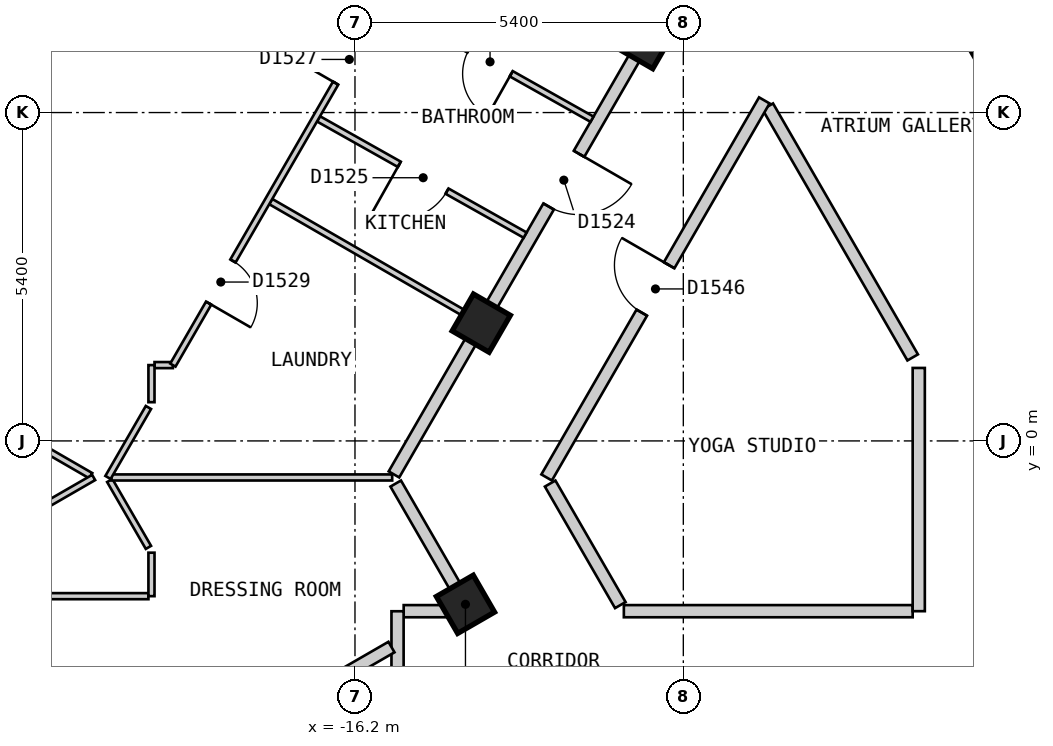
"""IFC4 building model, lengths in metres.
Left out: names, types, materials, properties, quantities, classifications, styles, units other than length and angle.
Written with IfcOpenShell. Run it as: python <this file> out.ifc"""

import sys

from ifc_helpers import new_model, si_unit, direction, frame, frame_2d, origin, origin_2d, place, context, subcontext, project, spatial, polyline, rectangle, outline, extrude, element, fill, save


model = new_model("IFC4")
c1 = context("Model", 3, precision=1e-05, world=origin(), true_north=direction((0.0, 1.0)))
c2 = subcontext(c1, "Body", "Model", "MODEL_VIEW")
j1 = project(units=[si_unit("LENGTHUNIT", "METRE"), si_unit("PLANEANGLEUNIT", "RADIAN")], contexts=[c1])
p1 = place(None, origin())
s1 = spatial("IfcSite", under=j1, at=p1, CompositionType="ELEMENT")
p2 = place(p1, origin())
s2 = spatial("IfcBuilding", under=s1, at=p2, CompositionType="ELEMENT")
p3 = place(p2, frame((0.0, 0.0, 184.2)))
s3 = spatial("IfcBuildingStorey", under=s2, at=p3, CompositionType="ELEMENT", Elevation=184.2)
for number, where, z_axis, x_axis in (
    (1, (-14.383, -2.687, 0.0), (0.0, 0.0, 1.0), (0.5, -0.866, 0.0)),
    (2, (-11.431, 6.6, 0.0), (0.0, 0.0, 1.0), (-0.5, -0.866, 0.0)),
    (3, (-14.123, 1.937, 0.0), (0.0, 0.0, 1.0), (-0.5, -0.866, 0.0)),
):
    element("IfcColumn", number, at=place(p3, frame(where, z_axis=z_axis, x_axis=x_axis)), inside=s3, PredefinedType="COLUMN", context=c2, shape_type="SweptSolid", body=[
        extrude(rectangle(XDim=0.7, YDim=0.7, at=origin_2d()), origin(), (0.0, 0.0, 1.0), 3.0),
    ])
p4 = place(p3, frame((-14.592, 21.625, 0.0), z_axis=(0.0, 0.0, 1.0), x_axis=(-0.500010537973, -0.866019319597, 0.0)))
e4 = element("IfcWall", 4, at=p4, inside=s3, PredefinedType="SOLIDWALL", context=c2, shape_type="SweptSolid", body=[
    extrude(outline(polyline([(0.0, -0.15), (22.863, -0.15), (22.783, 0.15), (0.08, 0.15), (0.0, -0.15)])), origin(), (0.0, 0.0, 1.0), 2.7),
])
p5 = place(p4, frame((1.259, 0.0, 0.15)))
e5 = element("IfcOpeningElement", 5, at=p5, cuts=e4, PredefinedType="OPENING", context=c2, shape_type="SweptSolid", body=[
    extrude(rectangle(XDim=1.5, YDim=2.1, at=frame_2d((0.75, 1.05))), frame((0.0, 0.16, 0.0), z_axis=(0.0, -1.0, 0.0), x_axis=(1.0, 0.0, 0.0)), (0.0, 0.0, 1.0), 0.32),
])
p6 = place(p4, frame((3.952, 0.0, 0.15)))
e6 = element("IfcOpeningElement", 6, at=p6, cuts=e4, PredefinedType="OPENING", context=c2, shape_type="SweptSolid", body=[
    extrude(rectangle(XDim=1.5, YDim=2.1, at=frame_2d((0.75, 1.05))), frame((0.0, 0.16, 0.0), z_axis=(0.0, -1.0, 0.0), x_axis=(1.0, 0.0, 0.0)), (0.0, 0.0, 1.0), 0.32),
])
p7 = place(p4, frame((6.644, 0.0, 0.15)))
e7 = element("IfcOpeningElement", 7, at=p7, cuts=e4, PredefinedType="OPENING", context=c2, shape_type="SweptSolid", body=[
    extrude(rectangle(XDim=1.5, YDim=2.1, at=frame_2d((0.75, 1.05))), frame((0.0, 0.16, 0.0), z_axis=(0.0, -1.0, 0.0), x_axis=(1.0, 0.0, 0.0)), (0.0, 0.0, 1.0), 0.32),
])
p8 = place(p4, frame((9.335, 0.0, 0.15)))
e8 = element("IfcOpeningElement", 8, at=p8, cuts=e4, PredefinedType="OPENING", context=c2, shape_type="SweptSolid", body=[
    extrude(rectangle(XDim=1.5, YDim=2.1, at=frame_2d((0.75, 1.05))), frame((0.0, 0.16, 0.0), z_axis=(0.0, -1.0, 0.0), x_axis=(1.0, 0.0, 0.0)), (0.0, 0.0, 1.0), 0.32),
])
p9 = place(p4, frame((12.028, 0.0, 0.15)))
e9 = element("IfcOpeningElement", 9, at=p9, cuts=e4, PredefinedType="OPENING", context=c2, shape_type="SweptSolid", body=[
    extrude(rectangle(XDim=1.5, YDim=2.1, at=frame_2d((0.75, 1.05))), frame((0.0, 0.16, 0.0), z_axis=(0.0, -1.0, 0.0), x_axis=(1.0, 0.0, 0.0)), (0.0, 0.0, 1.0), 0.32),
])
p10 = place(p4, frame((14.72, 0.0, 0.15)))
e10 = element("IfcOpeningElement", 10, at=p10, cuts=e4, PredefinedType="OPENING", context=c2, shape_type="SweptSolid", body=[
    extrude(rectangle(XDim=1.5, YDim=2.1, at=frame_2d((0.75, 1.05))), frame((0.0, 0.16, 0.0), z_axis=(0.0, -1.0, 0.0), x_axis=(1.0, 0.0, 0.0)), (0.0, 0.0, 1.0), 0.32),
])
p11 = place(p4, frame((17.411, 0.0, 0.15)))
e11 = element("IfcOpeningElement", 11, at=p11, cuts=e4, PredefinedType="OPENING", context=c2, shape_type="SweptSolid", body=[
    extrude(rectangle(XDim=1.5, YDim=2.1, at=frame_2d((0.75, 1.05))), frame((0.0, 0.16, 0.0), z_axis=(0.0, -1.0, 0.0), x_axis=(1.0, 0.0, 0.0)), (0.0, 0.0, 1.0), 0.32),
])
p12 = place(p4, frame((20.104, 0.0, 0.15)))
e12 = element("IfcOpeningElement", 12, at=p12, cuts=e4, PredefinedType="OPENING", context=c2, shape_type="SweptSolid", body=[
    extrude(rectangle(XDim=1.5, YDim=2.1, at=frame_2d((0.75, 1.05))), frame((0.0, 0.16, 0.0), z_axis=(0.0, -1.0, 0.0), x_axis=(1.0, 0.0, 0.0)), (0.0, 0.0, 1.0), 0.32),
])
p13 = place(p3, frame((-26.024, -3.025, 0.0), z_axis=(0.0, 0.0, 1.0), x_axis=(0.500018670445, -0.86601462413, 0.0)))
e13 = element("IfcWall", 13, at=p13, inside=s3, PredefinedType="SOLIDWALL", context=c2, shape_type="SweptSolid", body=[
    extrude(outline(polyline([(0.0, -0.15), (20.785, -0.15), (20.705, 0.15), (0.08, 0.15), (0.0, -0.15)])), origin(), (0.0, 0.0, 1.0), 2.7),
])
p14 = place(p13, frame((1.13, 0.0, 0.15)))
e14 = element("IfcOpeningElement", 14, at=p14, cuts=e13, PredefinedType="OPENING", context=c2, shape_type="SweptSolid", body=[
    extrude(rectangle(XDim=1.5, YDim=2.1, at=frame_2d((0.75, 1.05))), frame((0.0, 0.16, 0.0), z_axis=(0.0, -1.0, 0.0), x_axis=(1.0, 0.0, 0.0)), (0.0, 0.0, 1.0), 0.32),
])
p15 = place(p13, frame((3.562, 0.0, 0.15)))
e15 = element("IfcOpeningElement", 15, at=p15, cuts=e13, PredefinedType="OPENING", context=c2, shape_type="SweptSolid", body=[
    extrude(rectangle(XDim=1.5, YDim=2.1, at=frame_2d((0.75, 1.05))), frame((0.0, 0.16, 0.0), z_axis=(0.0, -1.0, 0.0), x_axis=(1.0, 0.0, 0.0)), (0.0, 0.0, 1.0), 0.32),
])
p16 = place(p13, frame((5.994, 0.0, 0.15)))
e16 = element("IfcOpeningElement", 16, at=p16, cuts=e13, PredefinedType="OPENING", context=c2, shape_type="SweptSolid", body=[
    extrude(rectangle(XDim=1.5, YDim=2.1, at=frame_2d((0.75, 1.05))), frame((0.0, 0.16, 0.0), z_axis=(0.0, -1.0, 0.0), x_axis=(1.0, 0.0, 0.0)), (0.0, 0.0, 1.0), 0.32),
])
p17 = place(p13, frame((8.425, 0.0, 0.15)))
e17 = element("IfcOpeningElement", 17, at=p17, cuts=e13, PredefinedType="OPENING", context=c2, shape_type="SweptSolid", body=[
    extrude(rectangle(XDim=1.5, YDim=2.1, at=frame_2d((0.75, 1.05))), frame((0.0, 0.16, 0.0), z_axis=(0.0, -1.0, 0.0), x_axis=(1.0, 0.0, 0.0)), (0.0, 0.0, 1.0), 0.32),
])
p18 = place(p13, frame((10.857, 0.0, 0.15)))
e18 = element("IfcOpeningElement", 18, at=p18, cuts=e13, PredefinedType="OPENING", context=c2, shape_type="SweptSolid", body=[
    extrude(rectangle(XDim=1.5, YDim=2.1, at=frame_2d((0.75, 1.05))), frame((0.0, 0.16, 0.0), z_axis=(0.0, -1.0, 0.0), x_axis=(1.0, 0.0, 0.0)), (0.0, 0.0, 1.0), 0.32),
])
p19 = place(p13, frame((13.289, 0.0, 0.15)))
e19 = element("IfcOpeningElement", 19, at=p19, cuts=e13, PredefinedType="OPENING", context=c2, shape_type="SweptSolid", body=[
    extrude(rectangle(XDim=1.5, YDim=2.1, at=frame_2d((0.75, 1.05))), frame((0.0, 0.16, 0.0), z_axis=(0.0, -1.0, 0.0), x_axis=(1.0, 0.0, 0.0)), (0.0, 0.0, 1.0), 0.32),
])
p20 = place(p13, frame((15.722, 0.0, 0.15)))
e20 = element("IfcOpeningElement", 20, at=p20, cuts=e13, PredefinedType="OPENING", context=c2, shape_type="SweptSolid", body=[
    extrude(rectangle(XDim=1.5, YDim=2.1, at=frame_2d((0.75, 1.05))), frame((0.0, 0.16, 0.0), z_axis=(0.0, -1.0, 0.0), x_axis=(1.0, 0.0, 0.0)), (0.0, 0.0, 1.0), 0.32),
])
p21 = place(p13, frame((18.154, 0.0, 0.15)))
e21 = element("IfcOpeningElement", 21, at=p21, cuts=e13, PredefinedType="OPENING", context=c2, shape_type="SweptSolid", body=[
    extrude(rectangle(XDim=1.5, YDim=2.1, at=frame_2d((0.75, 1.05))), frame((0.0, 0.16, 0.0), z_axis=(0.0, -1.0, 0.0), x_axis=(1.0, 0.0, 0.0)), (0.0, 0.0, 1.0), 0.32),
])
p22 = place(p3, frame((-9.411, 5.5, 0.0), z_axis=(0.0, 0.0, 1.0), x_axis=(0.500018099276, -0.86601495391, 0.0)))
e22 = element("IfcWall", 22, at=p22, inside=s3, PredefinedType="PARTITIONING", context=c2, shape_type="SweptSolid", body=[
    extrude(rectangle(XDim=4.765, YDim=0.2, at=frame_2d((2.383, 0.0))), origin(), (0.0, 0.0, 1.0), 2.7),
])
for number, where, z_axis, x_axis in (
    (23, (-12.99, -0.701, 0.0), (0.0, 0.0, 1.0), (0.5, -0.866, 0.0)),
    (24, (-15.53, -0.701, 0.0), (0.0, 0.0, 1.0), (0.5, -0.866, 0.0)),
):
    element("IfcWall", number, at=place(p3, frame(where, z_axis=z_axis, x_axis=x_axis)), inside=s3, PredefinedType="PARTITIONING", context=c2, shape_type="SweptSolid", body=[
        extrude(rectangle(XDim=2.308, YDim=0.2, at=frame_2d((1.154, 0.0))), origin(), (0.0, 0.0, 1.0), 2.7),
    ])
p23 = place(p3, frame((-15.399, -2.8, 0.0), z_axis=(0.0, 0.0, 1.0), x_axis=(1.0, 0.0, 0.0)))
e25 = element("IfcWall", 25, at=p23, inside=s3, PredefinedType="PARTITIONING", context=c2, shape_type="SweptSolid", body=[
    extrude(rectangle(XDim=1.081, YDim=0.2, at=frame_2d((0.541, 0.0))), origin(), (0.0, 0.0, 1.0), 2.7),
])
p24 = place(p3, frame((-11.778, -2.8, 0.0), z_axis=(0.0, 0.0, 1.0), x_axis=(1.0, 0.0, 0.0)))
e26 = element("IfcWall", 26, at=p24, inside=s3, PredefinedType="PARTITIONING", context=c2, shape_type="SweptSolid", body=[
    extrude(rectangle(XDim=4.75, YDim=0.2, at=frame_2d((2.375, 0.0))), origin(), (0.0, 0.0, 1.0), 2.7),
])
p25 = place(p3, frame((-13.048, -0.601, 0.0), z_axis=(0.0, 0.0, 1.0), x_axis=(0.499982180423, 0.866035691677, 0.0)))
e27 = element("IfcWall", 27, at=p25, inside=s3, PredefinedType="PARTITIONING", context=c2, shape_type="SweptSolid", body=[
    extrude(rectangle(XDim=7.16, YDim=0.2, at=frame_2d((3.58, 0.0))), origin(), (0.0, 0.0, 1.0), 2.7),
])
p26 = place(p25, frame((3.13, 0.0, 0.0)))
e28 = element("IfcOpeningElement", 28, at=p26, cuts=e27, PredefinedType="OPENING", context=c2, shape_type="SweptSolid", body=[
    extrude(rectangle(XDim=0.9, YDim=2.1, at=frame_2d((0.45, 1.05))), frame((0.0, 0.11, 0.0), z_axis=(0.0, -1.0, 0.0), x_axis=(1.0, 0.0, 0.0)), (0.0, 0.0, 1.0), 0.22),
])
p27 = place(p3, frame((-15.559, -0.551, 0.0), z_axis=(0.0, 0.0, 1.0), x_axis=(0.499964997208, 0.866045611713, 0.0)))
e29 = element("IfcWall", 29, at=p27, inside=s3, PredefinedType="PARTITIONING", context=c2, shape_type="SweptSolid", body=[
    extrude(rectangle(XDim=9.643, YDim=0.2, at=frame_2d((4.821, 0.0))), origin(), (0.0, 0.0, 1.0), 2.7),
])
p28 = place(p27, frame((5.088, 0.0, 0.0)))
e30 = element("IfcOpeningElement", 30, at=p28, cuts=e29, PredefinedType="OPENING", context=c2, shape_type="SweptSolid", body=[
    extrude(rectangle(XDim=1.0, YDim=2.1, at=frame_2d((0.5, 1.05))), frame((0.0, 0.11, 0.0), z_axis=(0.0, -1.0, 0.0), x_axis=(1.0, 0.0, 0.0)), (0.0, 0.0, 1.0), 0.22),
])
p29 = place(p3, frame((-6.928, -2.8, 0.0), z_axis=(0.0, 0.0, 1.0), x_axis=(0.0, 1.0, 0.0)))
e31 = element("IfcWall", 31, at=p29, inside=s3, PredefinedType="PARTITIONING", context=c2, shape_type="SweptSolid", body=[
    extrude(rectangle(XDim=4.0, YDim=0.2, at=frame_2d((2.0, 0.0))), origin(), (0.0, 0.0, 1.0), 2.7),
])
p30 = place(p3, frame((-15.5, -6.6, 0.0), z_axis=(0.0, 0.0, 1.0), x_axis=(0.0, 1.0, 0.0)))
e32 = element("IfcWall", 32, at=p30, inside=s3, PredefinedType="PARTITIONING", context=c2, shape_type="SweptSolid", body=[
    extrude(rectangle(XDim=3.799, YDim=0.2, at=frame_2d((1.899, 0.0))), origin(), (0.0, 0.0, 1.0), 2.7),
])
p31 = place(p3, frame((-20.233, -0.651, 0.0), z_axis=(0.0, 0.0, 1.0), x_axis=(0.500498449207, -0.865737432679, 0.0)))
e33 = element("IfcWall", 33, at=p31, inside=s3, PredefinedType="PARTITIONING", context=c2, shape_type="SweptSolid", body=[
    extrude(rectangle(XDim=1.271, YDim=0.1, at=frame_2d((0.635, 0.0))), origin(), (0.0, 0.0, 1.0), 2.7),
])
p32 = place(p3, frame((-16.799, 5.296, 0.0), z_axis=(0.0, 0.0, 1.0), x_axis=(0.871565499758, -0.490279083413, 0.0)))
e34 = element("IfcWall", 34, at=p32, inside=s3, PredefinedType="PARTITIONING", context=c2, shape_type="SweptSolid", body=[
    extrude(rectangle(XDim=3.897, YDim=0.1, at=frame_2d((1.949, 0.0))), origin(), (0.0, 0.0, 1.0), 2.7),
])
p33 = place(p32, frame((1.524, 0.0, 0.0)))
e35 = element("IfcOpeningElement", 35, at=p33, cuts=e34, PredefinedType="OPENING", context=c2, shape_type="SweptSolid", body=[
    extrude(rectangle(XDim=0.9, YDim=2.1, at=frame_2d((0.45, 1.05))), frame((0.0, 0.06, 0.0), z_axis=(0.0, -1.0, 0.0), x_axis=(1.0, 0.0, 0.0)), (0.0, 0.0, 1.0), 0.12),
])
p34 = place(p3, frame((-15.699, 7.202, 0.0), z_axis=(0.0, 0.0, 1.0), x_axis=(0.871565499758, -0.490279083413, 0.0)))
e36 = element("IfcWall", 36, at=p34, inside=s3, PredefinedType="PARTITIONING", context=c2, shape_type="SweptSolid", body=[
    extrude(rectangle(XDim=3.897, YDim=0.1, at=frame_2d((1.949, 0.0))), origin(), (0.0, 0.0, 1.0), 2.7),
])
p35 = place(p34, frame((1.574, 0.0, 0.0)))
e37 = element("IfcOpeningElement", 37, at=p35, cuts=e36, PredefinedType="OPENING", context=c2, shape_type="SweptSolid", body=[
    extrude(rectangle(XDim=0.8, YDim=2.1, at=frame_2d((0.4, 1.05))), frame((0.0, 0.06, 0.0), z_axis=(0.0, -1.0, 0.0), x_axis=(1.0, 0.0, 0.0)), (0.0, 0.0, 1.0), 0.12),
])
p36 = place(p3, frame((-17.585, 3.936, 0.0), z_axis=(0.0, 0.0, 1.0), x_axis=(0.865979019114, -0.500080332001, 0.0)))
e38 = element("IfcWall", 38, at=p36, inside=s3, PredefinedType="PARTITIONING", context=c2, shape_type="SweptSolid", body=[
    extrude(rectangle(XDim=3.897, YDim=0.1, at=frame_2d((1.949, 0.0))), origin(), (0.0, 0.0, 1.0), 2.7),
])
p37 = place(p3, frame((-25.562, 2.325, 0.0), z_axis=(0.0, 0.0, 1.0), x_axis=(0.86599890761, -0.500045889912, 0.0)))
e39 = element("IfcWall", 39, at=p37, inside=s3, PredefinedType="PARTITIONING", context=c2, shape_type="SweptSolid", body=[
    extrude(rectangle(XDim=5.793, YDim=0.1, at=frame_2d((2.897, 0.0))), origin(), (0.0, 0.0, 1.0), 2.7),
])
p38 = place(p37, frame((2.476, 0.0, 0.0)))
e40 = element("IfcOpeningElement", 40, at=p38, cuts=e39, PredefinedType="OPENING", context=c2, shape_type="SweptSolid", body=[
    extrude(rectangle(XDim=0.9, YDim=2.1, at=frame_2d((0.45, 1.05))), frame((0.0, 0.06, 0.0), z_axis=(0.0, -1.0, 0.0), x_axis=(1.0, 0.0, 0.0)), (0.0, 0.0, 1.0), 0.12),
])
p39 = place(p3, frame((-20.204, -0.601, 0.0), z_axis=(0.0, 0.0, 1.0), x_axis=(1.0, 0.0, 0.0)))
e41 = element("IfcWall", 41, at=p39, inside=s3, PredefinedType="PARTITIONING", context=c2, shape_type="SweptSolid", body=[
    extrude(rectangle(XDim=4.616, YDim=0.1, at=frame_2d((2.308, 0.0))), origin(), (0.0, 0.0, 1.0), 2.7),
])
p40 = place(p3, frame((-22.247, -2.553, 0.0), z_axis=(0.0, 0.0, 1.0), x_axis=(1.0, 0.0, 0.0)))
e42 = element("IfcWall", 42, at=p40, inside=s3, PredefinedType="PARTITIONING", context=c2, shape_type="SweptSolid", body=[
    extrude(rectangle(XDim=2.65, YDim=0.1, at=frame_2d((1.325, 0.0))), origin(), (0.0, 0.0, 1.0), 2.7),
])
p41 = place(p3, frame((-19.497, 1.247, 0.0), z_axis=(0.0, 0.0, 1.0), x_axis=(1.0, 0.0, 0.0)))
e43 = element("IfcWall", 43, at=p41, inside=s3, PredefinedType="PARTITIONING", context=c2, shape_type="SweptSolid", body=[
    extrude(rectangle(XDim=0.302, YDim=0.1, at=frame_2d((0.151, 0.0))), origin(), (0.0, 0.0, 1.0), 2.7),
])
p42 = place(p3, frame((-20.262, -0.601, 0.0), z_axis=(0.0, 0.0, 1.0), x_axis=(0.500247001515, 0.86588275042, 0.0)))
e44 = element("IfcWall", 44, at=p42, inside=s3, PredefinedType="PARTITIONING", context=c2, shape_type="SweptSolid", body=[
    extrude(rectangle(XDim=1.329, YDim=0.1, at=frame_2d((0.665, 0.0))), origin(), (0.0, 0.0, 1.0), 2.7),
])
p43 = place(p3, frame((-19.195, 1.247, 0.0), z_axis=(0.0, 0.0, 1.0), x_axis=(0.499959862915, 0.866048575701, 0.0)))
e45 = element("IfcWall", 45, at=p43, inside=s3, PredefinedType="PARTITIONING", context=c2, shape_type="SweptSolid", body=[
    extrude(rectangle(XDim=7.566, YDim=0.1, at=frame_2d((3.783, 0.0))), origin(), (0.0, 0.0, 1.0), 2.7),
])
p44 = place(p43, frame((5.354, 0.0, 0.0)))
e46 = element("IfcOpeningElement", 46, at=p44, cuts=e45, PredefinedType="OPENING", context=c2, shape_type="SweptSolid", body=[
    extrude(rectangle(XDim=0.9, YDim=2.1, at=frame_2d((0.45, 1.05))), frame((0.0, 0.06, 0.0), z_axis=(0.0, -1.0, 0.0), x_axis=(1.0, 0.0, 0.0)), (0.0, 0.0, 1.0), 0.12),
])
p45 = place(p43, frame((1.177, 0.0, 0.0)))
e47 = element("IfcOpeningElement", 47, at=p45, cuts=e45, PredefinedType="OPENING", context=c2, shape_type="SweptSolid", body=[
    extrude(rectangle(XDim=0.8, YDim=2.1, at=frame_2d((0.4, 1.05))), frame((0.0, 0.06, 0.0), z_axis=(0.0, -1.0, 0.0), x_axis=(1.0, 0.0, 0.0)), (0.0, 0.0, 1.0), 0.12),
])
p46 = place(p3, frame((-19.547, -2.553, 0.0), z_axis=(0.0, 0.0, 1.0), x_axis=(0.0, 1.0, 0.0)))
e48 = element("IfcWall", 48, at=p46, inside=s3, PredefinedType="PARTITIONING", context=c2, shape_type="SweptSolid", body=[
    extrude(rectangle(XDim=0.715, YDim=0.1, at=frame_2d((0.357, 0.0))), origin(), (0.0, 0.0, 1.0), 2.7),
])
p47 = place(p3, frame((-19.547, 0.637, 0.0), z_axis=(0.0, 0.0, 1.0), x_axis=(0.0, 1.0, 0.0)))
e49 = element("IfcWall", 49, at=p47, inside=s3, PredefinedType="PARTITIONING", context=c2, shape_type="SweptSolid", body=[
    extrude(rectangle(XDim=0.61, YDim=0.1, at=frame_2d((0.305, 0.0))), origin(), (0.0, 0.0, 1.0), 2.7),
])
p48 = place(p3, frame((-25.563, -3.524, 0.0), z_axis=(0.0, 0.0, 1.0), x_axis=(0.866128586522, 0.499821239653, 0.0)))
e50 = element("IfcWall", 50, at=p48, inside=s3, PredefinedType="PARTITIONING", context=c2, shape_type="SweptSolid", body=[
    extrude(rectangle(XDim=5.848, YDim=0.1, at=frame_2d((2.924, 0.0))), origin(), (0.0, 0.0, 1.0), 2.7),
])
p49 = place(p48, frame((2.474, 0.0, 0.0)))
e51 = element("IfcOpeningElement", 51, at=p49, cuts=e50, PredefinedType="OPENING", context=c2, shape_type="SweptSolid", body=[
    extrude(rectangle(XDim=0.9, YDim=2.1, at=frame_2d((0.45, 1.05))), frame((0.0, 0.06, 0.0), z_axis=(0.0, -1.0, 0.0), x_axis=(1.0, 0.0, 0.0)), (0.0, 0.0, 1.0), 0.12),
])
p50 = place(p3, frame((-23.13, -7.737, 0.0), z_axis=(0.0, 0.0, 1.0), x_axis=(0.866033148899, 0.499986584829, 0.0)))
e52 = element("IfcWall", 52, at=p50, inside=s3, PredefinedType="PARTITIONING", context=c2, shape_type="SweptSolid", body=[
    extrude(rectangle(XDim=8.695, YDim=0.2, at=frame_2d((4.347, 0.0))), origin(), (0.0, 0.0, 1.0), 2.7),
])
p51 = place(p28, origin())
e53 = element("IfcDoor", 53, at=p51, inside=s3, OperationType="SINGLE_SWING_RIGHT", PredefinedType="DOOR", context=c2, shape_type="SweptSolid", body=[
    extrude(rectangle(XDim=1.0, YDim=2.1, at=frame_2d((0.5, 1.05))), frame((0.0, 0.025, 0.0), z_axis=(0.0, -1.0, 0.0), x_axis=(1.0, 0.0, 0.0)), (0.0, 0.0, 1.0), 0.05),
])
fill(e30, e53)
p52 = place(p33, origin())
e54 = element("IfcDoor", 54, at=p52, inside=s3, OperationType="SINGLE_SWING_LEFT", PredefinedType="DOOR", context=c2, shape_type="SweptSolid", body=[
    extrude(rectangle(XDim=0.9, YDim=2.1, at=frame_2d((0.45, 1.05))), frame((0.0, 0.025, 0.0), z_axis=(0.0, -1.0, 0.0), x_axis=(1.0, 0.0, 0.0)), (0.0, 0.0, 1.0), 0.05),
])
fill(e35, e54)
p53 = place(p35, origin())
e55 = element("IfcDoor", 55, at=p53, inside=s3, OperationType="SINGLE_SWING_RIGHT", PredefinedType="DOOR", context=c2, shape_type="SweptSolid", body=[
    extrude(rectangle(XDim=0.8, YDim=2.1, at=frame_2d((0.4, 1.05))), frame((0.0, 0.025, 0.0), z_axis=(0.0, -1.0, 0.0), x_axis=(1.0, 0.0, 0.0)), (0.0, 0.0, 1.0), 0.05),
])
fill(e37, e55)
p54 = place(p44, origin())
e56 = element("IfcDoor", 56, at=p54, inside=s3, OperationType="SINGLE_SWING_LEFT", PredefinedType="DOOR", context=c2, shape_type="SweptSolid", body=[
    extrude(rectangle(XDim=0.9, YDim=2.1, at=frame_2d((0.45, 1.05))), frame((0.0, 0.025, 0.0), z_axis=(0.0, -1.0, 0.0), x_axis=(1.0, 0.0, 0.0)), (0.0, 0.0, 1.0), 0.05),
])
fill(e46, e56)
p55 = place(p45, origin())
e57 = element("IfcDoor", 57, at=p55, inside=s3, OperationType="SINGLE_SWING_LEFT", PredefinedType="DOOR", context=c2, shape_type="SweptSolid", body=[
    extrude(rectangle(XDim=0.8, YDim=2.1, at=frame_2d((0.4, 1.05))), frame((0.0, 0.025, 0.0), z_axis=(0.0, -1.0, 0.0), x_axis=(1.0, 0.0, 0.0)), (0.0, 0.0, 1.0), 0.05),
])
fill(e47, e57)
p56 = place(p26, origin())
e58 = element("IfcDoor", 58, at=p56, inside=s3, OperationType="SINGLE_SWING_RIGHT", PredefinedType="DOOR", context=c2, shape_type="SweptSolid", body=[
    extrude(rectangle(XDim=0.9, YDim=2.1, at=frame_2d((0.45, 1.05))), frame((0.0, 0.025, 0.0), z_axis=(0.0, -1.0, 0.0), x_axis=(1.0, 0.0, 0.0)), (0.0, 0.0, 1.0), 0.05),
])
fill(e28, e58)
save(model, sys.argv[1])
